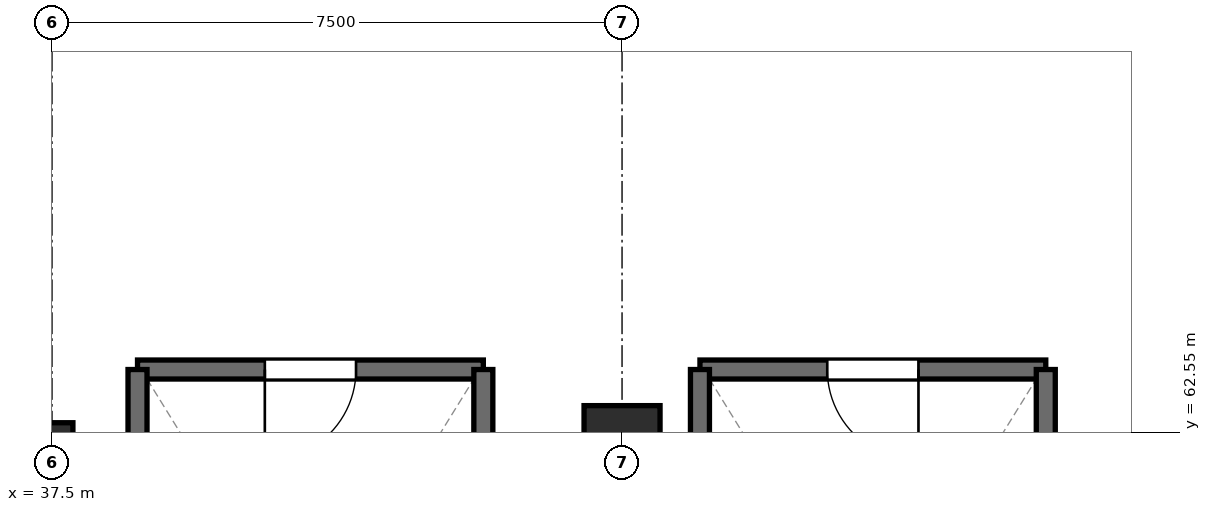
"""IFC4 building model, lengths in metres.
Left out: names, types, materials, properties, quantities, classifications, styles, units other than length and angle.
Written with IfcOpenShell. Run it as: python <this file> out.ifc"""

import sys

from ifc_helpers import new_model, si_unit, direction, frame, frame_2d, origin, origin_2d, place, context, subcontext, project, spatial, rectangle, extrude, element, fill, save


model = new_model("IFC4")
c1 = context("Model", 3, precision=1e-05, world=origin(), true_north=direction((0.0, 1.0)))
c2 = subcontext(c1, "Body", "Model", "MODEL_VIEW")
j1 = project(units=[si_unit("LENGTHUNIT", "METRE"), si_unit("PLANEANGLEUNIT", "RADIAN")], contexts=[c1])
p1 = place(None, origin())
s1 = spatial("IfcSite", under=j1, at=p1, CompositionType="ELEMENT")
p2 = place(p1, origin())
s2 = spatial("IfcBuilding", under=s1, at=p2, CompositionType="ELEMENT")
p3 = place(p2, frame((0.0, 0.0, 9.4)))
s3 = spatial("IfcBuildingStorey", under=s2, at=p3, CompositionType="ELEMENT", Elevation=9.4)
p4 = place(p3, frame((37.5, 62.4, -0.45), z_axis=(0.0, 0.0, 1.0), x_axis=(1.0, 0.0, 0.0)))
e1 = element("IfcColumn", 1, at=p4, inside=s3, PredefinedType="COLUMN", context=c2, shape_type="SweptSolid", body=[
    extrude(rectangle(XDim=0.55, YDim=0.55, at=origin_2d()), origin(), (0.0, 0.0, 1.0), 4.77),
])
p5 = place(p3, frame((45.0, 62.4, -0.45), z_axis=(0.0, 0.0, 1.0), x_axis=(1.0, 0.0, 0.0)))
e2 = element("IfcColumn", 2, at=p5, inside=s3, PredefinedType="COLUMN", context=c2, shape_type="SweptSolid", body=[
    extrude(rectangle(XDim=1.0, YDim=1.0, at=origin_2d()), origin(), (0.0, 0.0, 1.0), 4.77),
])
p6 = place(p3, frame((50.575, 63.375, 0.0), z_axis=(0.0, 0.0, 1.0), x_axis=(-1.0, 0.0, 0.0)))
e3 = element("IfcWall", 3, at=p6, inside=s3, PredefinedType="SHEAR", context=c2, shape_type="SweptSolid", body=[
    extrude(rectangle(XDim=4.55, YDim=0.25, at=frame_2d((2.275, 0.0))), origin(), (0.0, 0.0, 1.0), 4.32),
])
p7 = place(p6, frame((1.675, 0.0, 0.0)))
e4 = element("IfcOpeningElement", 4, at=p7, cuts=e3, PredefinedType="OPENING", context=c2, shape_type="SweptSolid", body=[
    extrude(rectangle(XDim=1.2, YDim=2.2, at=frame_2d((0.6, 1.1))), frame((0.0, 0.137, 0.0), z_axis=(0.0, -1.0, 0.0), x_axis=(1.0, 0.0, 0.0)), (0.0, 0.0, 1.0), 0.274),
])
for number, where, z_axis, x_axis in (
    (5, (46.025, 63.375, 0.0), (0.0, 0.0, 1.0), (0.0, -1.0, 0.0)),
    (6, (50.575, 56.175, 0.0), (0.0, 0.0, 1.0), (0.0, 1.0, 0.0)),
):
    element("IfcWall", number, at=place(p3, frame(where, z_axis=z_axis, x_axis=x_axis)), inside=s3, PredefinedType="SHEAR", context=c2, shape_type="SweptSolid", body=[
        extrude(rectangle(XDim=7.2, YDim=0.25, at=frame_2d((3.6, 0.0))), origin(), (0.0, 0.0, 1.0), 4.32),
    ])
p8 = place(p3, frame((43.175, 63.375, 0.0), z_axis=(0.0, 0.0, 1.0), x_axis=(-1.0, 0.0, 0.0)))
e7 = element("IfcWall", 7, at=p8, inside=s3, PredefinedType="SHEAR", context=c2, shape_type="SweptSolid", body=[
    extrude(rectangle(XDim=4.55, YDim=0.25, at=frame_2d((2.275, 0.0))), origin(), (0.0, 0.0, 1.0), 4.32),
])
p9 = place(p8, frame((1.675, 0.0, 0.0)))
e8 = element("IfcOpeningElement", 8, at=p9, cuts=e7, PredefinedType="OPENING", context=c2, shape_type="SweptSolid", body=[
    extrude(rectangle(XDim=1.2, YDim=2.2, at=frame_2d((0.6, 1.1))), frame((0.0, 0.137, 0.0), z_axis=(0.0, -1.0, 0.0), x_axis=(1.0, 0.0, 0.0)), (0.0, 0.0, 1.0), 0.274),
])
for number, where, z_axis, x_axis in (
    (9, (38.625, 63.375, 0.0), (0.0, 0.0, 1.0), (0.0, -1.0, 0.0)),
    (10, (43.175, 56.175, 0.0), (0.0, 0.0, 1.0), (0.0, 1.0, 0.0)),
):
    element("IfcWall", number, at=place(p3, frame(where, z_axis=z_axis, x_axis=x_axis)), inside=s3, PredefinedType="SHEAR", context=c2, shape_type="SweptSolid", body=[
        extrude(rectangle(XDim=7.2, YDim=0.25, at=frame_2d((3.6, 0.0))), origin(), (0.0, 0.0, 1.0), 4.32),
    ])
p10 = place(p7, origin())
e11 = element("IfcDoor", 11, at=p10, inside=s3, OperationType="SINGLE_SWING_LEFT", PredefinedType="DOOR", context=c2, shape_type="SweptSolid", body=[
    extrude(rectangle(XDim=1.2, YDim=2.2, at=frame_2d((0.6, 1.1))), frame((0.0, 0.025, 0.0), z_axis=(0.0, -1.0, 0.0), x_axis=(1.0, 0.0, 0.0)), (0.0, 0.0, 1.0), 0.05),
])
fill(e4, e11)
p11 = place(p9, origin())
e12 = element("IfcDoor", 12, at=p11, inside=s3, OperationType="SINGLE_SWING_RIGHT", PredefinedType="DOOR", context=c2, shape_type="SweptSolid", body=[
    extrude(rectangle(XDim=1.2, YDim=2.2, at=frame_2d((0.6, 1.1))), frame((0.0, 0.025, 0.0), z_axis=(0.0, -1.0, 0.0), x_axis=(1.0, 0.0, 0.0)), (0.0, 0.0, 1.0), 0.05),
])
fill(e8, e12)
save(model, sys.argv[1])
